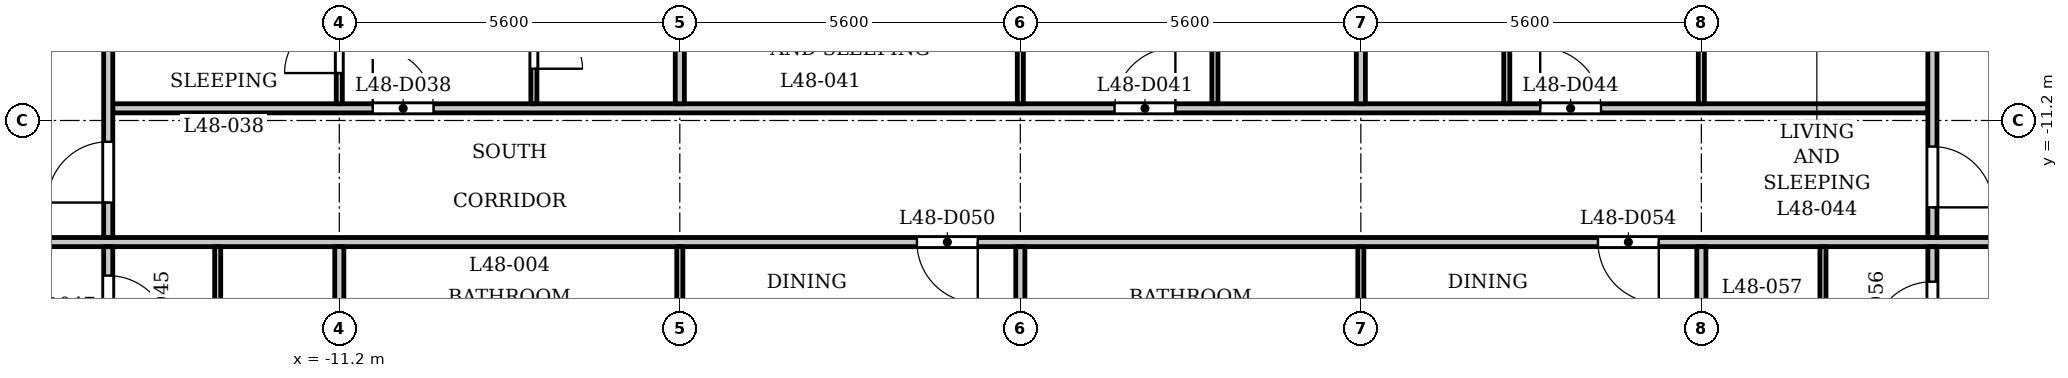
"""IFC4 building model, lengths in metres.
Left out: names, types, materials, properties, quantities, classifications, styles, units other than length and angle.
Written with IfcOpenShell. Run it as: python <this file> out.ifc"""

import sys

from ifc_helpers import new_model, si_unit, direction, frame, frame_2d, origin, place, context, subcontext, project, spatial, rectangle, extrude, element, fill, save


model = new_model("IFC4")
c1 = context("Model", 3, precision=1e-05, world=origin(), true_north=direction((0.0, 1.0)))
c2 = subcontext(c1, "Body", "Model", "MODEL_VIEW")
j1 = project(units=[si_unit("LENGTHUNIT", "METRE"), si_unit("PLANEANGLEUNIT", "RADIAN")], contexts=[c1])
p1 = place(None, origin())
s1 = spatial("IfcSite", under=j1, at=p1, CompositionType="ELEMENT")
p2 = place(p1, origin())
s2 = spatial("IfcBuilding", under=s1, at=p2, CompositionType="ELEMENT")
p3 = place(p2, frame((0.0, 0.0, 188.9)))
s3 = spatial("IfcBuildingStorey", under=s2, at=p3, CompositionType="ELEMENT", Elevation=188.9)
p4 = place(p3, frame((-17.4, -13.2, 0.0), z_axis=(0.0, 0.0, 1.0), x_axis=(1.0, 0.0, 0.0)))
e1 = element("IfcWall", 1, at=p4, inside=s3, PredefinedType="PARTITIONING", context=c2, shape_type="SweptSolid", body=[
    extrude(rectangle(XDim=34.8, YDim=0.15, at=frame_2d((17.4, 0.0))), origin(), (0.0, 0.0, 1.0), 3.2),
])
p5 = place(p4, frame((0.15, 0.0, 0.0)))
e2 = element("IfcOpeningElement", 2, at=p5, cuts=e1, PredefinedType="OPENING", context=c2, shape_type="SweptSolid", body=[
    extrude(rectangle(XDim=1.0, YDim=2.1, at=frame_2d((0.5, 1.05))), frame((0.0, 0.085, 0.0), z_axis=(0.0, -1.0, 0.0), x_axis=(1.0, 0.0, 0.0)), (0.0, 0.0, 1.0), 0.17),
])
p6 = place(p4, frame((33.55, 0.0, 0.0)))
e3 = element("IfcOpeningElement", 3, at=p6, cuts=e1, PredefinedType="OPENING", context=c2, shape_type="SweptSolid", body=[
    extrude(rectangle(XDim=1.0, YDim=2.1, at=frame_2d((0.5, 1.05))), frame((0.0, 0.085, 0.0), z_axis=(0.0, -1.0, 0.0), x_axis=(1.0, 0.0, 0.0)), (0.0, 0.0, 1.0), 0.17),
])
p7 = place(p4, frame((15.7, 0.0, 0.0)))
e4 = element("IfcOpeningElement", 4, at=p7, cuts=e1, PredefinedType="OPENING", context=c2, shape_type="SweptSolid", body=[
    extrude(rectangle(XDim=1.0, YDim=2.1, at=frame_2d((0.5, 1.05))), frame((0.0, 0.085, 0.0), z_axis=(0.0, -1.0, 0.0), x_axis=(1.0, 0.0, 0.0)), (0.0, 0.0, 1.0), 0.17),
])
p8 = place(p4, frame((26.9, 0.0, 0.0)))
e5 = element("IfcOpeningElement", 5, at=p8, cuts=e1, PredefinedType="OPENING", context=c2, shape_type="SweptSolid", body=[
    extrude(rectangle(XDim=1.0, YDim=2.1, at=frame_2d((0.5, 1.05))), frame((0.0, 0.085, 0.0), z_axis=(0.0, -1.0, 0.0), x_axis=(1.0, 0.0, 0.0)), (0.0, 0.0, 1.0), 0.17),
])
p9 = place(p3, frame((-14.925, -11.0, 0.0), z_axis=(0.0, 0.0, 1.0), x_axis=(1.0, 0.0, 0.0)))
e6 = element("IfcWall", 6, at=p9, inside=s3, PredefinedType="PARTITIONING", context=c2, shape_type="SweptSolid", body=[
    extrude(rectangle(XDim=29.85, YDim=0.15, at=frame_2d((14.925, 0.0))), origin(), (0.0, 0.0, 1.0), 3.2),
])
p10 = place(p9, frame((4.275, 0.0, 0.0)))
e7 = element("IfcOpeningElement", 7, at=p10, cuts=e6, PredefinedType="OPENING", context=c2, shape_type="SweptSolid", body=[
    extrude(rectangle(XDim=1.0, YDim=2.1, at=frame_2d((0.5, 1.05))), frame((0.0, 0.085, 0.0), z_axis=(0.0, -1.0, 0.0), x_axis=(1.0, 0.0, 0.0)), (0.0, 0.0, 1.0), 0.17),
])
p11 = place(p9, frame((16.475, 0.0, 0.0)))
e8 = element("IfcOpeningElement", 8, at=p11, cuts=e6, PredefinedType="OPENING", context=c2, shape_type="SweptSolid", body=[
    extrude(rectangle(XDim=1.0, YDim=2.1, at=frame_2d((0.5, 1.05))), frame((0.0, 0.085, 0.0), z_axis=(0.0, -1.0, 0.0), x_axis=(1.0, 0.0, 0.0)), (0.0, 0.0, 1.0), 0.17),
])
p12 = place(p9, frame((23.475, 0.0, 0.0)))
e9 = element("IfcOpeningElement", 9, at=p12, cuts=e6, PredefinedType="OPENING", context=c2, shape_type="SweptSolid", body=[
    extrude(rectangle(XDim=1.0, YDim=2.1, at=frame_2d((0.5, 1.05))), frame((0.0, 0.085, 0.0), z_axis=(0.0, -1.0, 0.0), x_axis=(1.0, 0.0, 0.0)), (0.0, 0.0, 1.0), 0.17),
])
p13 = place(p3, frame((-15.0, -15.325, 0.0), z_axis=(0.0, 0.0, 1.0), x_axis=(0.0, 1.0, 0.0)))
e10 = element("IfcWall", 10, at=p13, inside=s3, PredefinedType="PARTITIONING", context=c2, shape_type="SweptSolid", body=[
    extrude(rectangle(XDim=2.05, YDim=0.15, at=frame_2d((1.025, 0.0))), origin(), (0.0, 0.0, 1.0), 3.2),
])
p14 = place(p13, frame((0.574, 0.0, 0.0)))
e11 = element("IfcOpeningElement", 11, at=p14, cuts=e10, PredefinedType="OPENING", context=c2, shape_type="SweptSolid", body=[
    extrude(rectangle(XDim=1.0, YDim=2.1, at=frame_2d((0.5, 1.05))), frame((0.0, 0.085, 0.0), z_axis=(0.0, -1.0, 0.0), x_axis=(1.0, 0.0, 0.0)), (0.0, 0.0, 1.0), 0.17),
])
p15 = place(p3, frame((-15.0, -13.125, 0.0), z_axis=(0.0, 0.0, 1.0), x_axis=(0.0, 1.0, 0.0)))
e12 = element("IfcWall", 12, at=p15, inside=s3, PredefinedType="PARTITIONING", context=c2, shape_type="SweptSolid", body=[
    extrude(rectangle(XDim=6.356, YDim=0.15, at=frame_2d((3.178, 0.0))), origin(), (0.0, 0.0, 1.0), 3.2),
])
p16 = place(p15, frame((0.575, 0.0, 0.0)))
e13 = element("IfcOpeningElement", 13, at=p16, cuts=e12, PredefinedType="OPENING", context=c2, shape_type="SweptSolid", body=[
    extrude(rectangle(XDim=1.0, YDim=2.1, at=frame_2d((0.5, 1.05))), frame((0.0, 0.085, 0.0), z_axis=(0.0, -1.0, 0.0), x_axis=(1.0, 0.0, 0.0)), (0.0, 0.0, 1.0), 0.17),
])
p17 = place(p3, frame((-13.2, -15.55, 0.0), z_axis=(0.0, 0.0, 1.0), x_axis=(0.0, 1.0, 0.0)))
e14 = element("IfcWall", 14, at=p17, inside=s3, PredefinedType="PARTITIONING", context=c2, shape_type="SweptSolid", body=[
    extrude(rectangle(XDim=2.275, YDim=0.1, at=frame_2d((1.138, 0.0))), origin(), (0.0, 0.0, 1.0), 3.2),
])
p18 = place(p3, frame((-11.2, -10.925, 0.0), z_axis=(0.0, 0.0, 1.0), x_axis=(0.0, 1.0, 0.0)))
e15 = element("IfcWall", 15, at=p18, inside=s3, PredefinedType="PARTITIONING", context=c2, shape_type="SweptSolid", body=[
    extrude(rectangle(XDim=3.605, YDim=0.1, at=frame_2d((1.802, 0.0))), origin(), (0.0, 0.0, 1.0), 3.2),
])
p19 = place(p18, frame((0.505, 0.0, 0.0)))
e16 = element("IfcOpeningElement", 16, at=p19, cuts=e15, PredefinedType="OPENING", context=c2, shape_type="SweptSolid", body=[
    extrude(rectangle(XDim=0.9, YDim=2.1, at=frame_2d((0.45, 1.05))), frame((0.0, 0.06, 0.0), z_axis=(0.0, -1.0, 0.0), x_axis=(1.0, 0.0, 0.0)), (0.0, 0.0, 1.0), 0.12),
])
p20 = place(p3, frame((-11.2, -15.55, 0.0), z_axis=(0.0, 0.0, 1.0), x_axis=(0.0, 1.0, 0.0)))
e17 = element("IfcWall", 17, at=p20, inside=s3, PredefinedType="PARTITIONING", context=c2, shape_type="SweptSolid", body=[
    extrude(rectangle(XDim=2.275, YDim=0.15, at=frame_2d((1.138, 0.0))), origin(), (0.0, 0.0, 1.0), 3.2),
])
p21 = place(p3, frame((-8.0, -10.925, 0.0), z_axis=(0.0, 0.0, 1.0), x_axis=(0.0, 1.0, 0.0)))
e18 = element("IfcWall", 18, at=p21, inside=s3, PredefinedType="PARTITIONING", context=c2, shape_type="SweptSolid", body=[
    extrude(rectangle(XDim=3.605, YDim=0.1, at=frame_2d((1.802, 0.0))), origin(), (0.0, 0.0, 1.0), 3.2),
])
p22 = place(p21, frame((0.576, 0.0, 0.0)))
e19 = element("IfcOpeningElement", 19, at=p22, cuts=e18, PredefinedType="OPENING", context=c2, shape_type="SweptSolid", body=[
    extrude(rectangle(XDim=0.8, YDim=2.1, at=frame_2d((0.4, 1.05))), frame((0.0, 0.06, 0.0), z_axis=(0.0, -1.0, 0.0), x_axis=(1.0, 0.0, 0.0)), (0.0, 0.0, 1.0), 0.12),
])
p23 = place(p3, frame((-5.6, -15.55, 0.0), z_axis=(0.0, 0.0, 1.0), x_axis=(0.0, 1.0, 0.0)))
e20 = element("IfcWall", 20, at=p23, inside=s3, PredefinedType="PARTITIONING", context=c2, shape_type="SweptSolid", body=[
    extrude(rectangle(XDim=2.275, YDim=0.1, at=frame_2d((1.138, 0.0))), origin(), (0.0, 0.0, 1.0), 3.2),
])
p24 = place(p3, frame((-5.6, -10.925, 0.0), z_axis=(0.0, 0.0, 1.0), x_axis=(0.0, 1.0, 0.0)))
e21 = element("IfcWall", 21, at=p24, inside=s3, PredefinedType="PARTITIONING", context=c2, shape_type="SweptSolid", body=[
    extrude(rectangle(XDim=3.605, YDim=0.15, at=frame_2d((1.802, 0.0))), origin(), (0.0, 0.0, 1.0), 3.2),
])
p25 = place(p3, frame((0.0, -10.925, 0.0), z_axis=(0.0, 0.0, 1.0), x_axis=(0.0, 1.0, 0.0)))
e22 = element("IfcWall", 22, at=p25, inside=s3, PredefinedType="PARTITIONING", context=c2, shape_type="SweptSolid", body=[
    extrude(rectangle(XDim=3.605, YDim=0.1, at=frame_2d((1.802, 0.0))), origin(), (0.0, 0.0, 1.0), 3.2),
])
p26 = place(p25, frame((1.005, 0.0, 0.0)))
e23 = element("IfcOpeningElement", 23, at=p26, cuts=e22, PredefinedType="OPENING", context=c2, shape_type="SweptSolid", body=[
    extrude(rectangle(XDim=0.9, YDim=2.1, at=frame_2d((0.45, 1.05))), frame((0.0, 0.06, 0.0), z_axis=(0.0, -1.0, 0.0), x_axis=(1.0, 0.0, 0.0)), (0.0, 0.0, 1.0), 0.12),
])
p27 = place(p3, frame((0.0, -15.55, 0.0), z_axis=(0.0, 0.0, 1.0), x_axis=(0.0, 1.0, 0.0)))
e24 = element("IfcWall", 24, at=p27, inside=s3, PredefinedType="PARTITIONING", context=c2, shape_type="SweptSolid", body=[
    extrude(rectangle(XDim=2.275, YDim=0.15, at=frame_2d((1.138, 0.0))), origin(), (0.0, 0.0, 1.0), 3.2),
])
p28 = place(p3, frame((3.2, -10.925, 0.0), z_axis=(0.0, 0.0, 1.0), x_axis=(0.0, 1.0, 0.0)))
e25 = element("IfcWall", 25, at=p28, inside=s3, PredefinedType="PARTITIONING", context=c2, shape_type="SweptSolid", body=[
    extrude(rectangle(XDim=3.605, YDim=0.1, at=frame_2d((1.802, 0.0))), origin(), (0.0, 0.0, 1.0), 3.2),
])
p29 = place(p28, frame((2.326, 0.0, 0.0)))
e26 = element("IfcOpeningElement", 26, at=p29, cuts=e25, PredefinedType="OPENING", context=c2, shape_type="SweptSolid", body=[
    extrude(rectangle(XDim=0.8, YDim=2.1, at=frame_2d((0.4, 1.05))), frame((0.0, 0.06, 0.0), z_axis=(0.0, -1.0, 0.0), x_axis=(1.0, 0.0, 0.0)), (0.0, 0.0, 1.0), 0.12),
])
p30 = place(p3, frame((5.6, -15.55, 0.0), z_axis=(0.0, 0.0, 1.0), x_axis=(0.0, 1.0, 0.0)))
e27 = element("IfcWall", 27, at=p30, inside=s3, PredefinedType="PARTITIONING", context=c2, shape_type="SweptSolid", body=[
    extrude(rectangle(XDim=2.275, YDim=0.1, at=frame_2d((1.138, 0.0))), origin(), (0.0, 0.0, 1.0), 3.2),
])
p31 = place(p3, frame((5.6, -10.925, 0.0), z_axis=(0.0, 0.0, 1.0), x_axis=(0.0, 1.0, 0.0)))
e28 = element("IfcWall", 28, at=p31, inside=s3, PredefinedType="PARTITIONING", context=c2, shape_type="SweptSolid", body=[
    extrude(rectangle(XDim=3.605, YDim=0.15, at=frame_2d((1.802, 0.0))), origin(), (0.0, 0.0, 1.0), 3.2),
])
p32 = place(p3, frame((8.0, -10.925, 0.0), z_axis=(0.0, 0.0, 1.0), x_axis=(0.0, 1.0, 0.0)))
e29 = element("IfcWall", 29, at=p32, inside=s3, PredefinedType="PARTITIONING", context=c2, shape_type="SweptSolid", body=[
    extrude(rectangle(XDim=3.605, YDim=0.1, at=frame_2d((1.802, 0.0))), origin(), (0.0, 0.0, 1.0), 3.2),
])
p33 = place(p32, frame((2.355, 0.0, 0.0)))
e30 = element("IfcOpeningElement", 30, at=p33, cuts=e29, PredefinedType="OPENING", context=c2, shape_type="SweptSolid", body=[
    extrude(rectangle(XDim=0.8, YDim=2.1, at=frame_2d((0.4, 1.05))), frame((0.0, 0.06, 0.0), z_axis=(0.0, -1.0, 0.0), x_axis=(1.0, 0.0, 0.0)), (0.0, 0.0, 1.0), 0.12),
])
p34 = place(p3, frame((11.2, -10.925, 0.0), z_axis=(0.0, 0.0, 1.0), x_axis=(0.0, 1.0, 0.0)))
e31 = element("IfcWall", 31, at=p34, inside=s3, PredefinedType="PARTITIONING", context=c2, shape_type="SweptSolid", body=[
    extrude(rectangle(XDim=3.605, YDim=0.1, at=frame_2d((1.802, 0.0))), origin(), (0.0, 0.0, 1.0), 3.2),
])
p35 = place(p34, frame((1.076, 0.0, 0.0)))
e32 = element("IfcOpeningElement", 32, at=p35, cuts=e31, PredefinedType="OPENING", context=c2, shape_type="SweptSolid", body=[
    extrude(rectangle(XDim=0.9, YDim=2.1, at=frame_2d((0.45, 1.05))), frame((0.0, 0.06, 0.0), z_axis=(0.0, -1.0, 0.0), x_axis=(1.0, 0.0, 0.0)), (0.0, 0.0, 1.0), 0.12),
])
p36 = place(p3, frame((11.2, -15.55, 0.0), z_axis=(0.0, 0.0, 1.0), x_axis=(0.0, 1.0, 0.0)))
e33 = element("IfcWall", 33, at=p36, inside=s3, PredefinedType="PARTITIONING", context=c2, shape_type="SweptSolid", body=[
    extrude(rectangle(XDim=2.275, YDim=0.15, at=frame_2d((1.138, 0.0))), origin(), (0.0, 0.0, 1.0), 3.2),
])
p37 = place(p3, frame((13.2, -15.55, 0.0), z_axis=(0.0, 0.0, 1.0), x_axis=(0.0, 1.0, 0.0)))
e34 = element("IfcWall", 34, at=p37, inside=s3, PredefinedType="PARTITIONING", context=c2, shape_type="SweptSolid", body=[
    extrude(rectangle(XDim=2.275, YDim=0.1, at=frame_2d((1.138, 0.0))), origin(), (0.0, 0.0, 1.0), 3.2),
])
p38 = place(p3, frame((15.0, -15.325, 0.0), z_axis=(0.0, 0.0, 1.0), x_axis=(0.0, 1.0, 0.0)))
e35 = element("IfcWall", 35, at=p38, inside=s3, PredefinedType="PARTITIONING", context=c2, shape_type="SweptSolid", body=[
    extrude(rectangle(XDim=2.05, YDim=0.15, at=frame_2d((1.025, 0.0))), origin(), (0.0, 0.0, 1.0), 3.2),
])
p39 = place(p38, frame((0.474, 0.0, 0.0)))
e36 = element("IfcOpeningElement", 36, at=p39, cuts=e35, PredefinedType="OPENING", context=c2, shape_type="SweptSolid", body=[
    extrude(rectangle(XDim=1.0, YDim=2.1, at=frame_2d((0.5, 1.05))), frame((0.0, 0.085, 0.0), z_axis=(0.0, -1.0, 0.0), x_axis=(1.0, 0.0, 0.0)), (0.0, 0.0, 1.0), 0.17),
])
p40 = place(p3, frame((15.0, -13.125, 0.0), z_axis=(0.0, 0.0, 1.0), x_axis=(0.0, 1.0, 0.0)))
e37 = element("IfcWall", 37, at=p40, inside=s3, PredefinedType="PARTITIONING", context=c2, shape_type="SweptSolid", body=[
    extrude(rectangle(XDim=6.356, YDim=0.15, at=frame_2d((3.178, 0.0))), origin(), (0.0, 0.0, 1.0), 3.2),
])
p41 = place(p40, frame((0.496, 0.0, 0.0)))
e38 = element("IfcOpeningElement", 38, at=p41, cuts=e37, PredefinedType="OPENING", context=c2, shape_type="SweptSolid", body=[
    extrude(rectangle(XDim=1.0, YDim=2.1, at=frame_2d((0.5, 1.05))), frame((0.0, 0.085, 0.0), z_axis=(0.0, -1.0, 0.0), x_axis=(1.0, 0.0, 0.0)), (0.0, 0.0, 1.0), 0.17),
])
p42 = place(p16, origin())
e39 = element("IfcDoor", 39, at=p42, inside=s3, OperationType="SINGLE_SWING_RIGHT", PredefinedType="DOOR", context=c2, shape_type="SweptSolid", body=[
    extrude(rectangle(XDim=1.0, YDim=2.1, at=frame_2d((0.5, 1.05))), frame((0.0, 0.025, 0.0), z_axis=(0.0, -1.0, 0.0), x_axis=(1.0, 0.0, 0.0)), (0.0, 0.0, 1.0), 0.05),
])
fill(e13, e39)
p43 = place(p41, origin())
e40 = element("IfcDoor", 40, at=p43, inside=s3, OperationType="SINGLE_SWING_LEFT", PredefinedType="DOOR", context=c2, shape_type="SweptSolid", body=[
    extrude(rectangle(XDim=1.0, YDim=2.1, at=frame_2d((0.5, 1.05))), frame((0.0, 0.025, 0.0), z_axis=(0.0, -1.0, 0.0), x_axis=(1.0, 0.0, 0.0)), (0.0, 0.0, 1.0), 0.05),
])
fill(e38, e40)
p44 = place(p10, origin())
e41 = element("IfcDoor", 41, at=p44, inside=s3, OperationType="SINGLE_SWING_RIGHT", PredefinedType="DOOR", context=c2, shape_type="SweptSolid", body=[
    extrude(rectangle(XDim=1.0, YDim=2.1, at=frame_2d((0.5, 1.05))), frame((0.0, 0.025, 0.0), z_axis=(0.0, -1.0, 0.0), x_axis=(1.0, 0.0, 0.0)), (0.0, 0.0, 1.0), 0.05),
])
fill(e7, e41)
p45 = place(p22, origin())
e42 = element("IfcDoor", 42, at=p45, inside=s3, OperationType="SINGLE_SWING_LEFT", PredefinedType="DOOR", context=c2, shape_type="SweptSolid", body=[
    extrude(rectangle(XDim=0.8, YDim=2.1, at=frame_2d((0.4, 1.05))), frame((0.0, 0.025, 0.0), z_axis=(0.0, -1.0, 0.0), x_axis=(1.0, 0.0, 0.0)), (0.0, 0.0, 1.0), 0.05),
])
fill(e19, e42)
p46 = place(p19, origin())
e43 = element("IfcDoor", 43, at=p46, inside=s3, OperationType="SINGLE_SWING_RIGHT", PredefinedType="DOOR", context=c2, shape_type="SweptSolid", body=[
    extrude(rectangle(XDim=0.9, YDim=2.1, at=frame_2d((0.45, 1.05))), frame((0.0, 0.025, 0.0), z_axis=(0.0, -1.0, 0.0), x_axis=(1.0, 0.0, 0.0)), (0.0, 0.0, 1.0), 0.05),
])
fill(e16, e43)
p47 = place(p11, origin())
e44 = element("IfcDoor", 44, at=p47, inside=s3, OperationType="SINGLE_SWING_LEFT", PredefinedType="DOOR", context=c2, shape_type="SweptSolid", body=[
    extrude(rectangle(XDim=1.0, YDim=2.1, at=frame_2d((0.5, 1.05))), frame((0.0, 0.025, 0.0), z_axis=(0.0, -1.0, 0.0), x_axis=(1.0, 0.0, 0.0)), (0.0, 0.0, 1.0), 0.05),
])
fill(e8, e44)
p48 = place(p12, origin())
e45 = element("IfcDoor", 45, at=p48, inside=s3, OperationType="SINGLE_SWING_RIGHT", PredefinedType="DOOR", context=c2, shape_type="SweptSolid", body=[
    extrude(rectangle(XDim=1.0, YDim=2.1, at=frame_2d((0.5, 1.05))), frame((0.0, 0.025, 0.0), z_axis=(0.0, -1.0, 0.0), x_axis=(1.0, 0.0, 0.0)), (0.0, 0.0, 1.0), 0.05),
])
fill(e9, e45)
p49 = place(p14, origin())
e46 = element("IfcDoor", 46, at=p49, inside=s3, OperationType="SINGLE_SWING_LEFT", PredefinedType="DOOR", context=c2, shape_type="SweptSolid", body=[
    extrude(rectangle(XDim=1.0, YDim=2.1, at=frame_2d((0.5, 1.05))), frame((0.0, 0.025, 0.0), z_axis=(0.0, -1.0, 0.0), x_axis=(1.0, 0.0, 0.0)), (0.0, 0.0, 1.0), 0.05),
])
fill(e11, e46)
p50 = place(p7, origin())
e47 = element("IfcDoor", 47, at=p50, inside=s3, OperationType="SINGLE_SWING_RIGHT", PredefinedType="DOOR", context=c2, shape_type="SweptSolid", body=[
    extrude(rectangle(XDim=1.0, YDim=2.1, at=frame_2d((0.5, 1.05))), frame((0.0, 0.025, 0.0), z_axis=(0.0, -1.0, 0.0), x_axis=(1.0, 0.0, 0.0)), (0.0, 0.0, 1.0), 0.05),
])
fill(e4, e47)
p51 = place(p8, origin())
e48 = element("IfcDoor", 48, at=p51, inside=s3, OperationType="SINGLE_SWING_RIGHT", PredefinedType="DOOR", context=c2, shape_type="SweptSolid", body=[
    extrude(rectangle(XDim=1.0, YDim=2.1, at=frame_2d((0.5, 1.05))), frame((0.0, 0.025, 0.0), z_axis=(0.0, -1.0, 0.0), x_axis=(1.0, 0.0, 0.0)), (0.0, 0.0, 1.0), 0.05),
])
fill(e5, e48)
p52 = place(p39, origin())
e49 = element("IfcDoor", 49, at=p52, inside=s3, OperationType="SINGLE_SWING_RIGHT", PredefinedType="DOOR", context=c2, shape_type="SweptSolid", body=[
    extrude(rectangle(XDim=1.0, YDim=2.1, at=frame_2d((0.5, 1.05))), frame((0.0, 0.025, 0.0), z_axis=(0.0, -1.0, 0.0), x_axis=(1.0, 0.0, 0.0)), (0.0, 0.0, 1.0), 0.05),
])
fill(e36, e49)
save(model, sys.argv[1])
